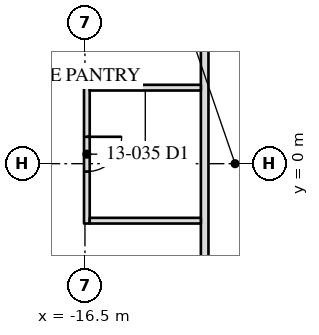
"""IFC4 building model, lengths in metres.
Left out: names, types, materials, properties, quantities, classifications, styles, units other than length and angle.
Written with IfcOpenShell. Run it as: python <this file> out.ifc"""

import sys

from ifc_helpers import new_model, si_unit, direction, frame, frame_2d, origin, place, context, subcontext, project, spatial, rectangle, extrude, element, fill, save


model = new_model("IFC4")
c1 = context("Model", 3, precision=1e-05, world=origin(), true_north=direction((0.0, 1.0)))
c2 = subcontext(c1, "Body", "Model", "MODEL_VIEW")
j1 = project(units=[si_unit("LENGTHUNIT", "METRE"), si_unit("PLANEANGLEUNIT", "RADIAN")], contexts=[c1])
p1 = place(None, origin())
s1 = spatial("IfcSite", under=j1, at=p1, CompositionType="ELEMENT")
p2 = place(p1, origin())
s2 = spatial("IfcBuilding", under=s1, at=p2, CompositionType="ELEMENT")
p3 = place(p2, frame((0.0, 0.0, 57.0)))
s3 = spatial("IfcBuildingStorey", under=s2, at=p3, CompositionType="ELEMENT", Elevation=57.0)
p4 = place(p3, frame((-13.35, 13.45, 0.0), z_axis=(0.0, 0.0, 1.0), x_axis=(0.0, -1.0, 0.0)))
e1 = element("IfcWall", 1, at=p4, inside=s3, PredefinedType="PARTITIONING", context=c2, shape_type="SweptSolid", body=[
    extrude(rectangle(XDim=26.7, YDim=0.2, at=frame_2d((13.35, 0.0))), origin(), (0.0, 0.0, 1.0), 3.91),
])
p5 = place(p4, frame((5.992, 0.0, 0.0)))
e2 = element("IfcOpeningElement", 2, at=p5, cuts=e1, PredefinedType="OPENING", context=c2, shape_type="SweptSolid", body=[
    extrude(rectangle(XDim=0.915, YDim=2.134, at=frame_2d((0.458, 1.067))), frame((0.0, 0.11, 0.0), z_axis=(0.0, -1.0, 0.0), x_axis=(1.0, 0.0, 0.0)), (0.0, 0.0, 1.0), 0.22),
])
p6 = place(p3, frame((-16.45, 2.075, 0.0), z_axis=(0.0, 0.0, 1.0), x_axis=(0.0, -1.0, 0.0)))
e3 = element("IfcWall", 3, at=p6, inside=s3, PredefinedType="PARTITIONING", context=c2, shape_type="SweptSolid", body=[
    extrude(rectangle(XDim=3.65, YDim=0.15, at=frame_2d((1.825, 0.0))), origin(), (0.0, 0.0, 1.0), 3.91),
])
p7 = place(p6, frame((1.367, 0.0, 0.0)))
e4 = element("IfcOpeningElement", 4, at=p7, cuts=e3, PredefinedType="OPENING", context=c2, shape_type="SweptSolid", body=[
    extrude(rectangle(XDim=0.915, YDim=2.134, at=frame_2d((0.458, 1.067))), frame((0.0, 0.085, 0.0), z_axis=(0.0, -1.0, 0.0), x_axis=(1.0, 0.0, 0.0)), (0.0, 0.0, 1.0), 0.17),
])
for number, where, z_axis, x_axis in (
    (5, (-16.375, 2.0, 0.0), (0.0, 0.0, 1.0), (1.0, 0.0, 0.0)),
    (6, (-16.375, -1.5, 0.0), (0.0, 0.0, 1.0), (1.0, 0.0, 0.0)),
):
    element("IfcWall", number, at=place(p3, frame(where, z_axis=z_axis, x_axis=x_axis)), inside=s3, PredefinedType="PARTITIONING", context=c2, shape_type="SweptSolid", body=[
        extrude(rectangle(XDim=2.925, YDim=0.15, at=frame_2d((1.462, 0.0))), origin(), (0.0, 0.0, 1.0), 3.91),
    ])
p8 = place(p7, origin())
e7 = element("IfcDoor", 7, at=p8, inside=s3, OperationType="SINGLE_SWING_LEFT", PredefinedType="DOOR", context=c2, shape_type="SweptSolid", body=[
    extrude(rectangle(XDim=0.915, YDim=2.134, at=frame_2d((0.458, 1.067))), frame((0.0, 0.025, 0.0), z_axis=(0.0, -1.0, 0.0), x_axis=(1.0, 0.0, 0.0)), (0.0, 0.0, 1.0), 0.05),
])
fill(e4, e7)
save(model, sys.argv[1])
